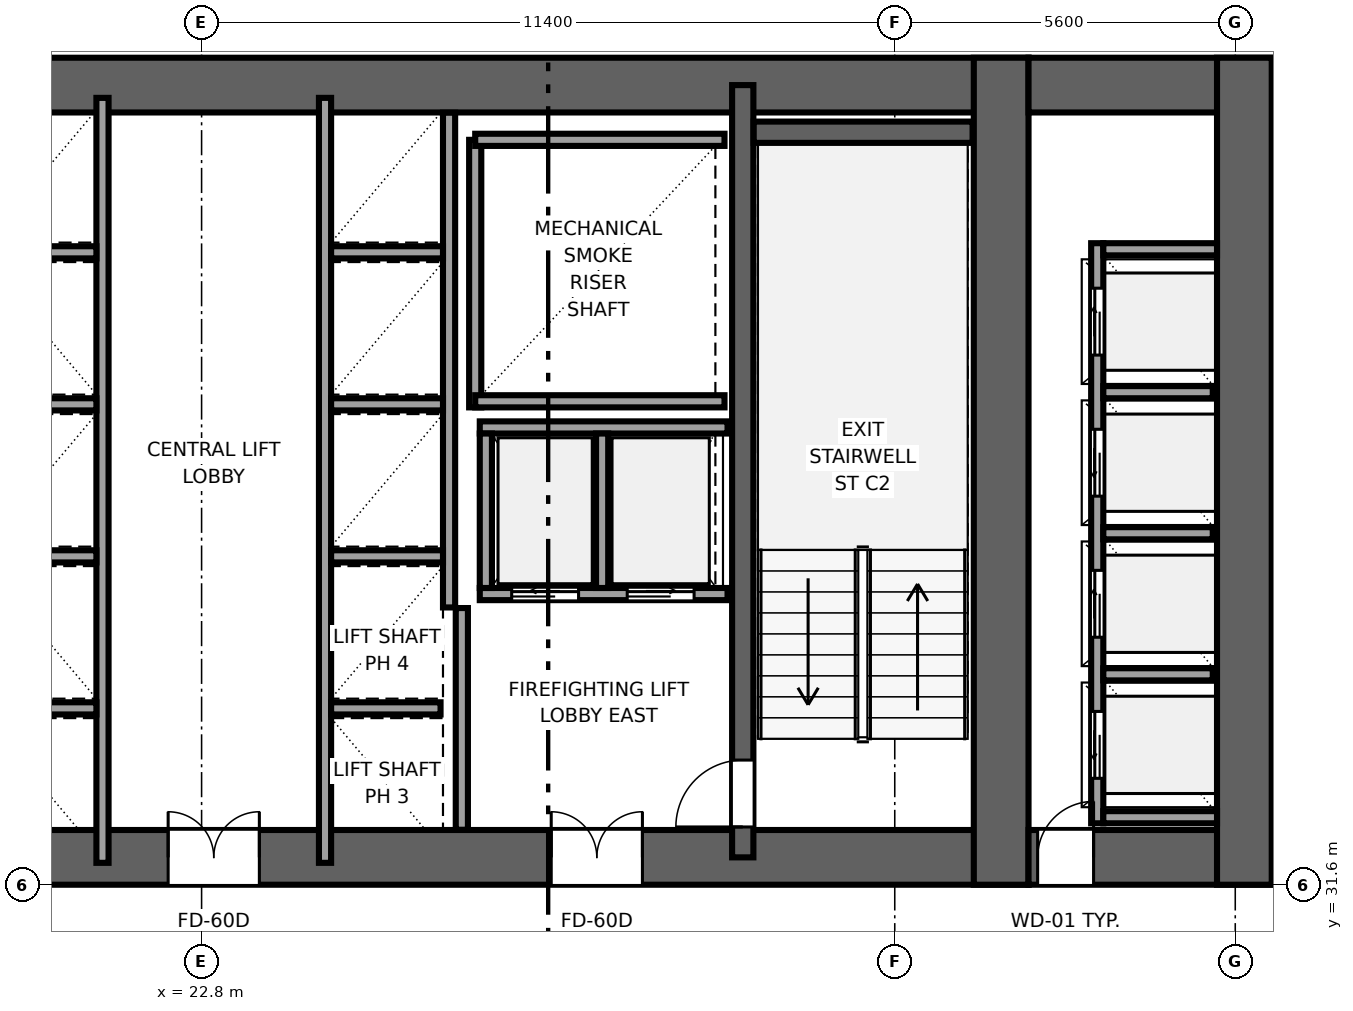
"""IFC4 building model, lengths in metres.
Left out: names, types, materials, properties, quantities, classifications, styles, units other than length and angle.
Written with IfcOpenShell. Run it as: python <this file> out.ifc"""

import sys

from ifc_helpers import new_model, si_unit, direction, frame, frame_2d, origin, place, context, subcontext, project, spatial, rectangle, extrude, source, transform, mapped, element, fill, save


model = new_model("IFC4")
c1 = context("Model", 3, precision=1e-05, world=origin(), true_north=direction((0.0, 1.0)))
c2 = subcontext(c1, "Body", "Model", "MODEL_VIEW")
j1 = project(units=[si_unit("LENGTHUNIT", "METRE"), si_unit("PLANEANGLEUNIT", "RADIAN")], contexts=[c1])
p1 = place(None, origin())
s1 = spatial("IfcSite", under=j1, at=p1, CompositionType="ELEMENT")
p2 = place(p1, origin())
s2 = spatial("IfcBuilding", under=s1, at=p2, CompositionType="ELEMENT")
p3 = place(p2, frame((0.0, 0.0, 67.5)))
s3 = spatial("IfcBuildingStorey", under=s2, at=p3, CompositionType="ELEMENT", Elevation=67.5)
p4 = place(p3, frame((9.6, 32.05, 0.0), z_axis=(0.0, 0.0, 1.0), x_axis=(1.0, 0.0, 0.0)))
e1 = element("IfcWall", 1, at=p4, inside=s3, PredefinedType="SHEAR", context=c2, shape_type="SweptSolid", body=[
    extrude(rectangle(XDim=26.8, YDim=0.9, at=frame_2d((13.4, 0.0))), origin(), (0.0, 0.0, 1.0), 3.55),
])
p5 = place(p4, frame((6.52, 0.0, 0.0), z_axis=(0.0, 0.0, 1.0), x_axis=(-1.0, 0.0, 0.0)))
e2 = element("IfcOpeningElement", 2, at=p5, cuts=e1, PredefinedType="OPENING", context=c2, shape_type="SweptSolid", body=[
    extrude(rectangle(XDim=1.5, YDim=2.04, at=frame_2d((0.75, 1.02))), frame((0.0, 0.46, 0.0), z_axis=(0.0, -1.0, 0.0), x_axis=(1.0, 0.0, 0.0)), (0.0, 0.0, 1.0), 0.92),
])
p6 = place(p4, frame((14.15, 0.0, 0.0), z_axis=(0.0, 0.0, 1.0), x_axis=(-1.0, 0.0, 0.0)))
e3 = element("IfcOpeningElement", 3, at=p6, cuts=e1, PredefinedType="OPENING", context=c2, shape_type="SweptSolid", body=[
    extrude(rectangle(XDim=1.5, YDim=2.04, at=frame_2d((0.75, 1.02))), frame((0.0, 0.46, 0.0), z_axis=(0.0, -1.0, 0.0), x_axis=(1.0, 0.0, 0.0)), (0.0, 0.0, 1.0), 0.92),
])
p7 = place(p4, frame((20.45, 0.0, 0.0), z_axis=(0.0, 0.0, 1.0), x_axis=(-1.0, 0.0, 0.0)))
e4 = element("IfcOpeningElement", 4, at=p7, cuts=e1, PredefinedType="OPENING", context=c2, shape_type="SweptSolid", body=[
    extrude(rectangle(XDim=1.5, YDim=2.04, at=frame_2d((0.75, 1.02))), frame((0.0, 0.46, 0.0), z_axis=(0.0, -1.0, 0.0), x_axis=(1.0, 0.0, 0.0)), (0.0, 0.0, 1.0), 0.92),
])
p8 = place(p4, frame((8.57, 0.0, 0.0), z_axis=(0.0, 0.0, 1.0), x_axis=(-1.0, 0.0, 0.0)))
e5 = element("IfcOpeningElement", 5, at=p8, cuts=e1, PredefinedType="OPENING", context=c2, shape_type="SweptSolid", body=[
    extrude(rectangle(XDim=0.82, YDim=2.01, at=frame_2d((0.41, 1.005))), frame((0.0, 0.46, 0.0), z_axis=(0.0, -1.0, 0.0), x_axis=(1.0, 0.0, 0.0)), (0.0, 0.0, 1.0), 0.92),
])
p9 = place(p3, frame((9.6, 44.75, 0.0), z_axis=(0.0, 0.0, 1.0), x_axis=(1.0, 0.0, 0.0)))
e6 = element("IfcWall", 6, at=p9, inside=s3, PredefinedType="SHEAR", context=c2, shape_type="SweptSolid", body=[
    extrude(rectangle(XDim=26.8, YDim=0.9, at=frame_2d((13.4, 0.0))), origin(), (0.0, 0.0, 1.0), 3.55),
])
p10 = place(p3, frame((35.95, 31.6, 0.0), z_axis=(0.0, 0.0, 1.0), x_axis=(0.0, 1.0, 0.0)))
e7 = element("IfcWall", 7, at=p10, inside=s3, PredefinedType="SHEAR", context=c2, shape_type="SweptSolid", body=[
    extrude(rectangle(XDim=13.6, YDim=0.9, at=frame_2d((6.8, 0.0))), origin(), (0.0, 0.0, 1.0), 3.55),
])
p11 = place(p3, frame((31.7, 32.05, 0.0), z_axis=(0.0, 0.0, 1.0), x_axis=(0.0, 1.0, 0.0)))
e8 = element("IfcWall", 8, at=p11, inside=s3, PredefinedType="SHEAR", context=c2, shape_type="SweptSolid", body=[
    extrude(rectangle(XDim=12.7, YDim=0.35, at=frame_2d((6.35, 0.0))), origin(), (0.0, 0.0, 1.0), 3.55),
])
p12 = place(p11, frame((1.6, 0.0, 0.0), z_axis=(0.0, 0.0, 1.0), x_axis=(-1.0, 0.0, 0.0)))
e9 = element("IfcOpeningElement", 9, at=p12, cuts=e8, PredefinedType="OPENING", context=c2, shape_type="SweptSolid", body=[
    extrude(rectangle(XDim=1.1, YDim=2.12, at=frame_2d((0.55, 1.06))), frame((0.0, 0.185, 0.0), z_axis=(0.0, -1.0, 0.0), x_axis=(1.0, 0.0, 0.0)), (0.0, 0.0, 1.0), 0.37),
])
p13 = place(p3, frame((36.4, 32.05, 0.0), z_axis=(0.0, 0.0, 1.0), x_axis=(1.0, 0.0, 0.0)))
e10 = element("IfcWall", 10, at=p13, inside=s3, PredefinedType="SHEAR", context=c2, shape_type="SweptSolid", body=[
    extrude(rectangle(XDim=4.0, YDim=0.9, at=frame_2d((2.0, 0.0))), origin(), (0.0, 0.0, 1.0), 3.55),
])
p14 = place(p13, frame((1.07, 0.0, 0.0), z_axis=(0.0, 0.0, 1.0), x_axis=(-1.0, 0.0, 0.0)))
e11 = element("IfcOpeningElement", 11, at=p14, cuts=e10, PredefinedType="OPENING", context=c2, shape_type="SweptSolid", body=[
    extrude(rectangle(XDim=0.92, YDim=2.01, at=frame_2d((0.46, 1.005))), frame((0.0, 0.46, 0.0), z_axis=(0.0, -1.0, 0.0), x_axis=(1.0, 0.0, 0.0)), (0.0, 0.0, 1.0), 0.92),
])
p15 = place(p3, frame((36.4, 44.75, 0.0), z_axis=(0.0, 0.0, 1.0), x_axis=(1.0, 0.0, 0.0)))
e12 = element("IfcWall", 12, at=p15, inside=s3, PredefinedType="SHEAR", context=c2, shape_type="SweptSolid", body=[
    extrude(rectangle(XDim=4.0, YDim=0.9, at=frame_2d((2.0, 0.0))), origin(), (0.0, 0.0, 1.0), 3.55),
])
p16 = place(p3, frame((39.95, 31.6, 0.0), z_axis=(0.0, 0.0, 1.0), x_axis=(0.0, 1.0, 0.0)))
e13 = element("IfcWall", 13, at=p16, inside=s3, PredefinedType="SHEAR", context=c2, shape_type="SweptSolid", body=[
    extrude(rectangle(XDim=13.6, YDim=0.9, at=frame_2d((6.8, 0.0))), origin(), (0.0, 0.0, 1.0), 3.55),
])
p17 = place(p3, frame((31.88, 43.975, 0.0), z_axis=(0.0, 0.0, 1.0), x_axis=(1.0, 0.0, 0.0)))
e14 = element("IfcWall", 14, at=p17, inside=s3, PredefinedType="SHEAR", context=c2, shape_type="SweptSolid", body=[
    extrude(rectangle(XDim=3.6, YDim=0.35, at=frame_2d((1.8, 0.0))), origin(), (0.0, 0.0, 1.0), 3.55),
])
p18 = place(p3, frame((27.3, 39.45, 0.0), z_axis=(0.0, 0.0, 1.0), x_axis=(0.0, 1.0, 0.0)))
e15 = element("IfcWall", 15, at=p18, inside=s3, PredefinedType="SOLIDWALL", context=c2, shape_type="SweptSolid", body=[
    extrude(rectangle(XDim=4.4, YDim=0.2, at=frame_2d((2.2, 0.0))), origin(), (0.0, 0.0, 1.0), 3.37),
])
for number, where, z_axis, x_axis in (
    (16, (27.3, 39.55, 0.0), (0.0, 0.0, 1.0), (1.0, 0.0, 0.0)),
    (17, (27.3, 43.85, 0.0), (0.0, 0.0, 1.0), (1.0, 0.0, 0.0)),
):
    element("IfcWall", number, at=place(p3, frame(where, z_axis=z_axis, x_axis=x_axis)), inside=s3, PredefinedType="SOLIDWALL", context=c2, shape_type="SweptSolid", body=[
        extrude(rectangle(XDim=4.1, YDim=0.2, at=frame_2d((2.05, 0.0))), origin(), (0.0, 0.0, 1.0), 3.37),
    ])
p19 = place(p3, frame((27.08, 32.504, 0.0), z_axis=(0.0, 0.0, 1.0), x_axis=(0.0, 1.0, 0.0)))
e18 = element("IfcWall", 18, at=p19, inside=s3, PredefinedType="SOLIDWALL", context=c2, shape_type="SweptSolid", body=[
    extrude(rectangle(XDim=3.646, YDim=0.2, at=frame_2d((1.823, 0.0))), origin(), (0.0, 0.0, 1.0), 3.37),
])
p20 = place(p3, frame((21.17, 31.96, 0.0), z_axis=(0.0, 0.0, 1.0), x_axis=(0.0, 1.0, 0.0)))
e19 = element("IfcWall", 19, at=p20, inside=s3, PredefinedType="SOLIDWALL", context=c2, shape_type="SweptSolid", body=[
    extrude(rectangle(XDim=12.58, YDim=0.2, at=frame_2d((6.29, 0.0))), origin(), (0.0, 0.0, 1.0), 3.37),
])
p21 = place(p3, frame((19.27, 34.5, 0.0), z_axis=(0.0, 0.0, 1.0), x_axis=(1.0, 0.0, 0.0)))
e20 = element("IfcWall", 20, at=p21, inside=s3, PredefinedType="SOLIDWALL", context=c2, shape_type="SweptSolid", body=[
    extrude(rectangle(XDim=1.8, YDim=0.2, at=frame_2d((0.9, 0.0))), origin(), (0.0, 0.0, 1.0), 3.37),
])
for number, where, z_axis, x_axis in (
    (21, (19.23, 37.0, 0.0), (0.0, 0.0, 1.0), (1.0, 0.0, 0.0)),
    (22, (19.23, 39.5, 0.0), (0.0, 0.0, 1.0), (1.0, 0.0, 0.0)),
    (23, (19.23, 42.0, 0.0), (0.0, 0.0, 1.0), (1.0, 0.0, 0.0)),
):
    element("IfcWall", number, at=place(p3, frame(where, z_axis=z_axis, x_axis=x_axis)), inside=s3, PredefinedType="SOLIDWALL", context=c2, shape_type="SweptSolid", body=[
        extrude(rectangle(XDim=1.84, YDim=0.2, at=frame_2d((0.92, 0.0))), origin(), (0.0, 0.0, 1.0), 3.37),
    ])
p22 = place(p3, frame((27.375, 36.38, 0.0), z_axis=(0.0, 0.0, 1.0), x_axis=(1.0, 0.0, 0.0)))
e24 = element("IfcWall", 24, at=p22, inside=s3, PredefinedType="SOLIDWALL", context=c2, shape_type="SweptSolid", body=[
    extrude(rectangle(XDim=4.075, YDim=0.2, at=frame_2d((2.038, 0.0))), origin(), (0.0, 0.0, 1.0), 3.37),
])
p23 = place(p22, frame((0.525, 0.0, 0.0)))
e25 = element("IfcOpeningElement", 25, at=p23, cuts=e24, PredefinedType="OPENING", context=c2, shape_type="SweptSolid", body=[
    extrude(rectangle(XDim=1.1, YDim=2.12, at=frame_2d((0.55, 1.06))), frame((0.0, 0.11, 0.0), z_axis=(0.0, -1.0, 0.0), x_axis=(1.0, 0.0, 0.0)), (0.0, 0.0, 1.0), 0.22),
])
p24 = place(p22, frame((2.425, 0.0, 0.0)))
e26 = element("IfcOpeningElement", 26, at=p24, cuts=e24, PredefinedType="OPENING", context=c2, shape_type="SweptSolid", body=[
    extrude(rectangle(XDim=1.1, YDim=2.12, at=frame_2d((0.55, 1.06))), frame((0.0, 0.11, 0.0), z_axis=(0.0, -1.0, 0.0), x_axis=(1.0, 0.0, 0.0)), (0.0, 0.0, 1.0), 0.22),
])
p25 = place(p3, frame((27.375, 39.12, 0.0), z_axis=(0.0, 0.0, 1.0), x_axis=(1.0, 0.0, 0.0)))
e27 = element("IfcWall", 27, at=p25, inside=s3, PredefinedType="SOLIDWALL", context=c2, shape_type="SweptSolid", body=[
    extrude(rectangle(XDim=4.075, YDim=0.2, at=frame_2d((2.038, 0.0))), origin(), (0.0, 0.0, 1.0), 3.37),
])
for number, where, z_axis, x_axis in (
    (28, (27.475, 36.48, 0.0), (0.0, 0.0, 1.0), (0.0, 1.0, 0.0)),
    (29, (29.387, 36.48, 0.0), (0.0, 0.0, 1.0), (0.0, 1.0, 0.0)),
):
    element("IfcWall", number, at=place(p3, frame(where, z_axis=z_axis, x_axis=x_axis)), inside=s3, PredefinedType="SOLIDWALL", context=c2, shape_type="SweptSolid", body=[
        extrude(rectangle(XDim=2.54, YDim=0.2, at=frame_2d((1.27, 0.0))), origin(), (0.0, 0.0, 1.0), 3.37),
    ])
p26 = place(p3, frame((24.83, 31.96, 0.0), z_axis=(0.0, 0.0, 1.0), x_axis=(0.0, 1.0, 0.0)))
e30 = element("IfcWall", 30, at=p26, inside=s3, PredefinedType="SOLIDWALL", context=c2, shape_type="SweptSolid", body=[
    extrude(rectangle(XDim=12.58, YDim=0.2, at=frame_2d((6.29, 0.0))), origin(), (0.0, 0.0, 1.0), 3.37),
])
p27 = place(p3, frame((26.87, 36.16, 0.0), z_axis=(0.0, 0.0, 1.0), x_axis=(0.0, 1.0, 0.0)))
e31 = element("IfcWall", 31, at=p27, inside=s3, PredefinedType="SOLIDWALL", context=c2, shape_type="SweptSolid", body=[
    extrude(rectangle(XDim=8.136, YDim=0.2, at=frame_2d((4.068, 0.0))), origin(), (0.0, 0.0, 1.0), 3.37),
])
p28 = place(p3, frame((24.93, 34.5, 0.0), z_axis=(0.0, 0.0, 1.0), x_axis=(1.0, 0.0, 0.0)))
e32 = element("IfcWall", 32, at=p28, inside=s3, PredefinedType="SOLIDWALL", context=c2, shape_type="SweptSolid", body=[
    extrude(rectangle(XDim=1.8, YDim=0.2, at=frame_2d((0.9, 0.0))), origin(), (0.0, 0.0, 1.0), 3.37),
])
for number, where, z_axis, x_axis in (
    (33, (24.93, 37.0, 0.0), (0.0, 0.0, 1.0), (1.0, 0.0, 0.0)),
    (34, (24.93, 39.5, 0.0), (0.0, 0.0, 1.0), (1.0, 0.0, 0.0)),
    (35, (24.93, 42.0, 0.0), (0.0, 0.0, 1.0), (1.0, 0.0, 0.0)),
):
    element("IfcWall", number, at=place(p3, frame(where, z_axis=z_axis, x_axis=x_axis)), inside=s3, PredefinedType="SOLIDWALL", context=c2, shape_type="SweptSolid", body=[
        extrude(rectangle(XDim=1.84, YDim=0.2, at=frame_2d((0.92, 0.0))), origin(), (0.0, 0.0, 1.0), 3.37),
    ])
p29 = place(p3, frame((37.53, 32.61, 0.0), z_axis=(0.0, 0.0, 1.0), x_axis=(0.0, 1.0, 0.0)))
e36 = element("IfcWall", 36, at=p29, inside=s3, PredefinedType="SOLIDWALL", context=c2, shape_type="SweptSolid", body=[
    extrude(rectangle(XDim=9.54, YDim=0.2, at=frame_2d((4.77, 0.0))), origin(), (0.0, 0.0, 1.0), 3.37),
])
p30 = place(p29, frame((0.74, 0.0, 0.0)))
e37 = element("IfcOpeningElement", 37, at=p30, cuts=e36, PredefinedType="OPENING", context=c2, shape_type="SweptSolid", body=[
    extrude(rectangle(XDim=1.1, YDim=2.12, at=frame_2d((0.55, 1.06))), frame((0.0, 0.11, 0.0), z_axis=(0.0, -1.0, 0.0), x_axis=(1.0, 0.0, 0.0)), (0.0, 0.0, 1.0), 0.22),
])
p31 = place(p29, frame((3.06, 0.0, 0.0)))
e38 = element("IfcOpeningElement", 38, at=p31, cuts=e36, PredefinedType="OPENING", context=c2, shape_type="SweptSolid", body=[
    extrude(rectangle(XDim=1.1, YDim=2.12, at=frame_2d((0.55, 1.06))), frame((0.0, 0.11, 0.0), z_axis=(0.0, -1.0, 0.0), x_axis=(1.0, 0.0, 0.0)), (0.0, 0.0, 1.0), 0.22),
])
p32 = place(p29, frame((5.38, 0.0, 0.0)))
e39 = element("IfcOpeningElement", 39, at=p32, cuts=e36, PredefinedType="OPENING", context=c2, shape_type="SweptSolid", body=[
    extrude(rectangle(XDim=1.1, YDim=2.12, at=frame_2d((0.55, 1.06))), frame((0.0, 0.11, 0.0), z_axis=(0.0, -1.0, 0.0), x_axis=(1.0, 0.0, 0.0)), (0.0, 0.0, 1.0), 0.22),
])
p33 = place(p29, frame((7.7, 0.0, 0.0)))
e40 = element("IfcOpeningElement", 40, at=p33, cuts=e36, PredefinedType="OPENING", context=c2, shape_type="SweptSolid", body=[
    extrude(rectangle(XDim=1.1, YDim=2.12, at=frame_2d((0.55, 1.06))), frame((0.0, 0.11, 0.0), z_axis=(0.0, -1.0, 0.0), x_axis=(1.0, 0.0, 0.0)), (0.0, 0.0, 1.0), 0.22),
])
for number, where, z_axis, x_axis in (
    (41, (37.63, 32.71, 0.0), (0.0, 0.0, 1.0), (1.0, 0.0, 0.0)),
    (42, (37.63, 42.05, 0.0), (0.0, 0.0, 1.0), (1.0, 0.0, 0.0)),
):
    element("IfcWall", number, at=place(p3, frame(where, z_axis=z_axis, x_axis=x_axis)), inside=s3, PredefinedType="SOLIDWALL", context=c2, shape_type="SweptSolid", body=[
        extrude(rectangle(XDim=1.87, YDim=0.2, at=frame_2d((0.935, 0.0))), origin(), (0.0, 0.0, 1.0), 3.37),
    ])
for number, where, z_axis, x_axis in (
    (43, (37.63, 35.06, 0.0), (0.0, 0.0, 1.0), (1.0, 0.0, 0.0)),
    (44, (37.63, 37.38, 0.0), (0.0, 0.0, 1.0), (1.0, 0.0, 0.0)),
    (45, (37.63, 39.7, 0.0), (0.0, 0.0, 1.0), (1.0, 0.0, 0.0)),
):
    element("IfcWall", number, at=place(p3, frame(where, z_axis=z_axis, x_axis=x_axis)), inside=s3, PredefinedType="SOLIDWALL", context=c2, shape_type="SweptSolid", body=[
        extrude(rectangle(XDim=1.8, YDim=0.2, at=frame_2d((0.9, 0.0))), origin(), (0.0, 0.0, 1.0), 3.37),
    ])
m1 = source(origin(), c2, "Body", "SweptSolid", [
    extrude(rectangle(XDim=1.1, YDim=2.12, at=frame_2d((0.55, 1.06))), frame((0.0, 0.025, 0.0), z_axis=(0.0, -1.0, 0.0), x_axis=(1.0, 0.0, 0.0)), (0.0, 0.0, 1.0), 0.05),
])
p34 = place(p12, origin())
e46 = element("IfcDoor", 46, at=p34, inside=s3, OperationType="SINGLE_SWING_LEFT", PredefinedType="DOOR", context=c2, shape_type="MappedRepresentation", body=[
    mapped(m1, transform((0.0, 0.0, 0.0), x_axis=(1.0, 0.0, 0.0), y_axis=(0.0, 1.0, 0.0), z_axis=(0.0, 0.0, 1.0), scale=1.0)),
])
fill(e9, e46)
m2 = source(origin(), c2, "Body", "SweptSolid", [
    extrude(rectangle(XDim=1.5, YDim=2.04, at=frame_2d((0.75, 1.02))), frame((0.0, 0.025, 0.0), z_axis=(0.0, -1.0, 0.0), x_axis=(1.0, 0.0, 0.0)), (0.0, 0.0, 1.0), 0.05),
])
p35 = place(p6, origin())
e47 = element("IfcDoor", 47, at=p35, inside=s3, OperationType="DOUBLE_DOOR_SINGLE_SWING", PredefinedType="DOOR", context=c2, shape_type="MappedRepresentation", body=[
    mapped(m2, transform((0.0, 0.0, 0.0), x_axis=(1.0, 0.0, 0.0), y_axis=(0.0, 1.0, 0.0), z_axis=(0.0, 0.0, 1.0), scale=1.0)),
])
fill(e3, e47)
p36 = place(p7, origin())
e48 = element("IfcDoor", 48, at=p36, inside=s3, OperationType="DOUBLE_DOOR_SINGLE_SWING", PredefinedType="DOOR", context=c2, shape_type="MappedRepresentation", body=[
    mapped(m2, transform((0.0, 0.0, 0.0), x_axis=(1.0, 0.0, 0.0), y_axis=(0.0, 1.0, 0.0), z_axis=(0.0, 0.0, 1.0), scale=1.0)),
])
fill(e4, e48)
m3 = source(origin(), c2, "Body", "SweptSolid", [
    extrude(rectangle(XDim=0.92, YDim=2.01, at=frame_2d((0.46, 1.005))), frame((0.0, 0.025, 0.0), z_axis=(0.0, -1.0, 0.0), x_axis=(1.0, 0.0, 0.0)), (0.0, 0.0, 1.0), 0.05),
])
p37 = place(p14, origin())
e49 = element("IfcDoor", 49, at=p37, inside=s3, OperationType="SINGLE_SWING_RIGHT", PredefinedType="DOOR", context=c2, shape_type="MappedRepresentation", body=[
    mapped(m3, transform((0.0, 0.0, 0.0), x_axis=(1.0, 0.0, 0.0), y_axis=(0.0, 1.0, 0.0), z_axis=(0.0, 0.0, 1.0), scale=1.0)),
])
fill(e11, e49)
m4 = source(origin(), c2, "Body", "SweptSolid", [
    extrude(rectangle(XDim=1.1, YDim=2.12, at=frame_2d((0.55, 1.06))), frame((0.0, 0.025, 0.0), z_axis=(0.0, -1.0, 0.0), x_axis=(1.0, 0.0, 0.0)), (0.0, 0.0, 1.0), 0.05),
])
p38 = place(p23, origin())
e50 = element("IfcDoor", 50, at=p38, inside=s3, OperationType="SLIDING_TO_LEFT", PredefinedType="DOOR", context=c2, shape_type="MappedRepresentation", body=[
    mapped(m4, transform((0.0, 0.0, 0.0), x_axis=(1.0, 0.0, 0.0), y_axis=(0.0, 1.0, 0.0), z_axis=(0.0, 0.0, 1.0), scale=1.0)),
])
fill(e25, e50)
p39 = place(p24, origin())
e51 = element("IfcDoor", 51, at=p39, inside=s3, OperationType="SLIDING_TO_RIGHT", PredefinedType="DOOR", context=c2, shape_type="MappedRepresentation", body=[
    mapped(m4, transform((0.0, 0.0, 0.0), x_axis=(1.0, 0.0, 0.0), y_axis=(0.0, 1.0, 0.0), z_axis=(0.0, 0.0, 1.0), scale=1.0)),
])
fill(e26, e51)
p40 = place(p30, origin())
e52 = element("IfcDoor", 52, at=p40, inside=s3, OperationType="SLIDING_TO_LEFT", PredefinedType="DOOR", context=c2, shape_type="MappedRepresentation", body=[
    mapped(m4, transform((0.0, 0.0, 0.0), x_axis=(1.0, 0.0, 0.0), y_axis=(0.0, 1.0, 0.0), z_axis=(0.0, 0.0, 1.0), scale=1.0)),
])
fill(e37, e52)
p41 = place(p31, origin())
e53 = element("IfcDoor", 53, at=p41, inside=s3, OperationType="SLIDING_TO_RIGHT", PredefinedType="DOOR", context=c2, shape_type="MappedRepresentation", body=[
    mapped(m4, transform((0.0, 0.0, 0.0), x_axis=(1.0, 0.0, 0.0), y_axis=(0.0, 1.0, 0.0), z_axis=(0.0, 0.0, 1.0), scale=1.0)),
])
fill(e38, e53)
p42 = place(p32, origin())
e54 = element("IfcDoor", 54, at=p42, inside=s3, OperationType="SLIDING_TO_LEFT", PredefinedType="DOOR", context=c2, shape_type="MappedRepresentation", body=[
    mapped(m4, transform((0.0, 0.0, 0.0), x_axis=(1.0, 0.0, 0.0), y_axis=(0.0, 1.0, 0.0), z_axis=(0.0, 0.0, 1.0), scale=1.0)),
])
fill(e39, e54)
p43 = place(p33, origin())
e55 = element("IfcDoor", 55, at=p43, inside=s3, OperationType="SLIDING_TO_RIGHT", PredefinedType="DOOR", context=c2, shape_type="MappedRepresentation", body=[
    mapped(m4, transform((0.0, 0.0, 0.0), x_axis=(1.0, 0.0, 0.0), y_axis=(0.0, 1.0, 0.0), z_axis=(0.0, 0.0, 1.0), scale=1.0)),
])
fill(e40, e55)
save(model, sys.argv[1])
